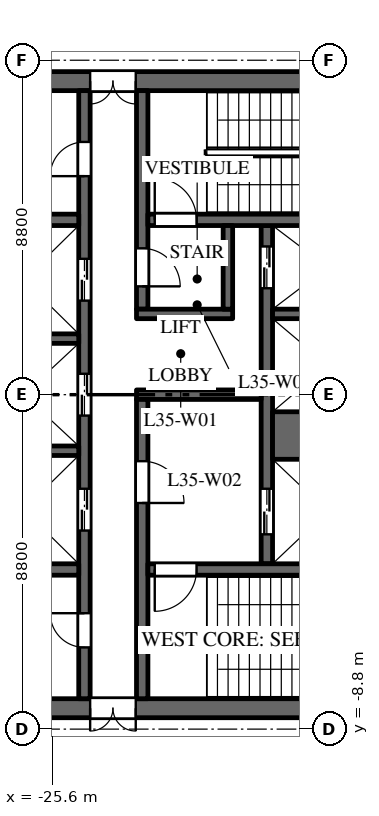
"""IFC4 building model, lengths in metres.
Left out: names, types, materials, properties, quantities, classifications, styles, units other than length and angle.
Written with IfcOpenShell. Run it as: python <this file> out.ifc"""

import sys

from ifc_helpers import new_model, si_unit, direction, frame, frame_2d, origin, place, context, subcontext, project, spatial, rectangle, extrude, element, fill, save


model = new_model("IFC4")
c1 = context("Model", 3, precision=1e-05, world=origin(), true_north=direction((0.0, 1.0)))
c2 = subcontext(c1, "Body", "Model", "MODEL_VIEW")
j1 = project(units=[si_unit("LENGTHUNIT", "METRE"), si_unit("PLANEANGLEUNIT", "RADIAN")], contexts=[c1])
p1 = place(None, origin())
s1 = spatial("IfcSite", under=j1, at=p1, CompositionType="ELEMENT")
p2 = place(p1, origin())
s2 = spatial("IfcBuilding", under=s1, at=p2, CompositionType="ELEMENT")
p3 = place(p2, frame((0.0, 0.0, 154.0)))
s3 = spatial("IfcBuildingStorey", under=s2, at=p3, CompositionType="ELEMENT", Elevation=154.0)
p4 = place(p3, frame((-16.5, 8.25, 0.0), z_axis=(0.0, 0.0, 1.0), x_axis=(-1.0, 0.0, 0.0)))
e1 = element("IfcWall", 1, at=p4, inside=s3, PredefinedType="SHEAR", context=c2, shape_type="SweptSolid", body=[
    extrude(rectangle(XDim=15.0, YDim=0.5, at=frame_2d((7.5, 0.0))), origin(), (0.0, 0.0, 1.0), 3.7),
])
p5 = place(p4, frame((6.9, 0.0, 0.0)))
e2 = element("IfcOpeningElement", 2, at=p5, cuts=e1, PredefinedType="OPENING", context=c2, shape_type="SweptSolid", body=[
    extrude(rectangle(XDim=1.2, YDim=2.1, at=frame_2d((0.6, 1.05))), frame((0.0, 0.26, 0.0), z_axis=(0.0, -1.0, 0.0), x_axis=(1.0, 0.0, 0.0)), (0.0, 0.0, 1.0), 0.52),
])
p6 = place(p4, frame((12.05, 0.0, 0.0)))
e3 = element("IfcOpeningElement", 3, at=p6, cuts=e1, PredefinedType="OPENING", context=c2, shape_type="SweptSolid", body=[
    extrude(rectangle(XDim=0.9, YDim=2.1, at=frame_2d((0.45, 1.05))), frame((0.0, 0.26, 0.0), z_axis=(0.0, -1.0, 0.0), x_axis=(1.0, 0.0, 0.0)), (0.0, 0.0, 1.0), 0.52),
])
p7 = place(p3, frame((-16.5, -8.25, 0.0), z_axis=(0.0, 0.0, 1.0), x_axis=(-1.0, 0.0, 0.0)))
e4 = element("IfcWall", 4, at=p7, inside=s3, PredefinedType="SHEAR", context=c2, shape_type="SweptSolid", body=[
    extrude(rectangle(XDim=15.0, YDim=0.5, at=frame_2d((7.5, 0.0))), origin(), (0.0, 0.0, 1.0), 3.7),
])
p8 = place(p7, frame((6.9, 0.0, 0.0)))
e5 = element("IfcOpeningElement", 5, at=p8, cuts=e4, PredefinedType="OPENING", context=c2, shape_type="SweptSolid", body=[
    extrude(rectangle(XDim=1.2, YDim=2.1, at=frame_2d((0.6, 1.05))), frame((0.0, 0.26, 0.0), z_axis=(0.0, -1.0, 0.0), x_axis=(1.0, 0.0, 0.0)), (0.0, 0.0, 1.0), 0.52),
])
p9 = place(p7, frame((12.05, 0.0, 0.0)))
e6 = element("IfcOpeningElement", 6, at=p9, cuts=e4, PredefinedType="OPENING", context=c2, shape_type="SweptSolid", body=[
    extrude(rectangle(XDim=0.9, YDim=2.1, at=frame_2d((0.45, 1.05))), frame((0.0, 0.26, 0.0), z_axis=(0.0, -1.0, 0.0), x_axis=(1.0, 0.0, 0.0)), (0.0, 0.0, 1.0), 0.52),
])
p10 = place(p3, frame((-19.95, -4.45, 0.0), z_axis=(0.0, 0.0, 1.0), x_axis=(0.0, 1.0, 0.0)))
e7 = element("IfcWall", 7, at=p10, inside=s3, PredefinedType="SHEAR", context=c2, shape_type="SweptSolid", body=[
    extrude(rectangle(XDim=8.9, YDim=0.3, at=frame_2d((4.45, 0.0))), origin(), (0.0, 0.0, 1.0), 3.7),
])
p11 = place(p10, frame((0.775, 0.0, 0.0)))
e8 = element("IfcOpeningElement", 8, at=p11, cuts=e7, PredefinedType="OPENING", context=c2, shape_type="SweptSolid", body=[
    extrude(rectangle(XDim=1.2, YDim=2.1, at=frame_2d((0.6, 1.05))), frame((0.0, 0.16, 0.0), z_axis=(0.0, -1.0, 0.0), x_axis=(1.0, 0.0, 0.0)), (0.0, 0.0, 1.0), 0.32),
])
p12 = place(p10, frame((7.25, 0.0, 0.0)))
e9 = element("IfcOpeningElement", 9, at=p12, cuts=e7, PredefinedType="OPENING", context=c2, shape_type="SweptSolid", body=[
    extrude(rectangle(XDim=1.1, YDim=2.1, at=frame_2d((0.55, 1.05))), frame((0.0, 0.16, 0.0), z_axis=(0.0, -1.0, 0.0), x_axis=(1.0, 0.0, 0.0)), (0.0, 0.0, 1.0), 0.32),
])
p13 = place(p3, frame((-24.75, -8.0, 0.0), z_axis=(0.0, 0.0, 1.0), x_axis=(0.0, 1.0, 0.0)))
e10 = element("IfcWall", 10, at=p13, inside=s3, PredefinedType="SHEAR", context=c2, shape_type="SweptSolid", body=[
    extrude(rectangle(XDim=16.0, YDim=0.3, at=frame_2d((8.0, 0.0))), origin(), (0.0, 0.0, 1.0), 3.7),
])
p14 = place(p13, frame((4.425, 0.0, 0.0)))
e11 = element("IfcOpeningElement", 11, at=p14, cuts=e10, PredefinedType="OPENING", context=c2, shape_type="SweptSolid", body=[
    extrude(rectangle(XDim=1.1, YDim=2.1, at=frame_2d((0.55, 1.05))), frame((0.0, 0.16, 0.0), z_axis=(0.0, -1.0, 0.0), x_axis=(1.0, 0.0, 0.0)), (0.0, 0.0, 1.0), 0.32),
])
p15 = place(p13, frame((7.45, 0.0, 0.0)))
e12 = element("IfcOpeningElement", 12, at=p15, cuts=e10, PredefinedType="OPENING", context=c2, shape_type="SweptSolid", body=[
    extrude(rectangle(XDim=1.1, YDim=2.1, at=frame_2d((0.55, 1.05))), frame((0.0, 0.16, 0.0), z_axis=(0.0, -1.0, 0.0), x_axis=(1.0, 0.0, 0.0)), (0.0, 0.0, 1.0), 0.32),
])
p16 = place(p13, frame((10.475, 0.0, 0.0)))
e13 = element("IfcOpeningElement", 13, at=p16, cuts=e10, PredefinedType="OPENING", context=c2, shape_type="SweptSolid", body=[
    extrude(rectangle(XDim=1.1, YDim=2.1, at=frame_2d((0.55, 1.05))), frame((0.0, 0.16, 0.0), z_axis=(0.0, -1.0, 0.0), x_axis=(1.0, 0.0, 0.0)), (0.0, 0.0, 1.0), 0.32),
])
p17 = place(p13, frame((13.75, 0.0, 0.0)))
e14 = element("IfcOpeningElement", 14, at=p17, cuts=e10, PredefinedType="OPENING", context=c2, shape_type="SweptSolid", body=[
    extrude(rectangle(XDim=0.9, YDim=2.1, at=frame_2d((0.45, 1.05))), frame((0.0, 0.16, 0.0), z_axis=(0.0, -1.0, 0.0), x_axis=(1.0, 0.0, 0.0)), (0.0, 0.0, 1.0), 0.32),
])
p18 = place(p13, frame((1.35, 0.0, 0.0)))
e15 = element("IfcOpeningElement", 15, at=p18, cuts=e10, PredefinedType="OPENING", context=c2, shape_type="SweptSolid", body=[
    extrude(rectangle(XDim=0.9, YDim=2.1, at=frame_2d((0.45, 1.05))), frame((0.0, 0.16, 0.0), z_axis=(0.0, -1.0, 0.0), x_axis=(1.0, 0.0, 0.0)), (0.0, 0.0, 1.0), 0.32),
])
p19 = place(p3, frame((-20.1, 0.0, 0.0), z_axis=(0.0, 0.0, 1.0), x_axis=(-1.0, 0.0, 0.0)))
e16 = element("IfcWall", 16, at=p19, inside=s3, PredefinedType="SHEAR", context=c2, shape_type="SweptSolid", body=[
    extrude(rectangle(XDim=3.28, YDim=0.25, at=frame_2d((1.64, 0.0))), origin(), (0.0, 0.0, 1.0), 3.7),
])
p20 = place(p3, frame((-24.9, 4.6, 0.0), z_axis=(0.0, 0.0, 1.0), x_axis=(-1.0, 0.0, 0.0)))
e17 = element("IfcWall", 17, at=p20, inside=s3, PredefinedType="SHEAR", context=c2, shape_type="SweptSolid", body=[
    extrude(rectangle(XDim=6.1, YDim=0.3, at=frame_2d((3.05, 0.0))), origin(), (0.0, 0.0, 1.0), 3.7),
])
p21 = place(p20, frame((4.2, 0.0, 0.0)))
e18 = element("IfcOpeningElement", 18, at=p21, cuts=e17, PredefinedType="OPENING", context=c2, shape_type="SweptSolid", body=[
    extrude(rectangle(XDim=0.9, YDim=2.1, at=frame_2d((0.45, 1.05))), frame((0.0, 0.16, 0.0), z_axis=(0.0, -1.0, 0.0), x_axis=(1.0, 0.0, 0.0)), (0.0, 0.0, 1.0), 0.32),
])
p22 = place(p3, frame((-24.9, -4.6, 0.0), z_axis=(0.0, 0.0, 1.0), x_axis=(-1.0, 0.0, 0.0)))
e19 = element("IfcWall", 19, at=p22, inside=s3, PredefinedType="SHEAR", context=c2, shape_type="SweptSolid", body=[
    extrude(rectangle(XDim=6.1, YDim=0.3, at=frame_2d((3.05, 0.0))), origin(), (0.0, 0.0, 1.0), 3.7),
])
p23 = place(p3, frame((-16.9, -1.075, 0.0), z_axis=(0.0, 0.0, 1.0), x_axis=(-1.0, 0.0, 0.0)))
e20 = element("IfcWall", 20, at=p23, inside=s3, PredefinedType="SHEAR", context=c2, shape_type="SweptSolid", body=[
    extrude(rectangle(XDim=2.9, YDim=1.25, at=frame_2d((1.45, 0.0))), origin(), (0.0, 0.0, 1.0), 3.7),
])
for number, where, z_axis, x_axis in (
    (21, (-16.9, 2.125, 0.0), (0.0, 0.0, 1.0), (-1.0, 0.0, 0.0)),
    (22, (-24.9, -1.475, 0.0), (0.0, 0.0, 1.0), (-1.0, 0.0, 0.0)),
    (23, (-24.9, 1.475, 0.0), (0.0, 0.0, 1.0), (-1.0, 0.0, 0.0)),
):
    element("IfcWall", number, at=place(p3, frame(where, z_axis=z_axis, x_axis=x_axis)), inside=s3, PredefinedType="SHEAR", context=c2, shape_type="SweptSolid", body=[
        extrude(rectangle(XDim=2.9, YDim=0.25, at=frame_2d((1.45, 0.0))), origin(), (0.0, 0.0, 1.0), 3.7),
    ])
p24 = place(p3, frame((-23.23, 2.25, 0.0), z_axis=(0.0, 0.0, 1.0), x_axis=(0.0, 1.0, 0.0)))
e24 = element("IfcWall", 24, at=p24, inside=s3, PredefinedType="SHEAR", context=c2, shape_type="SweptSolid", body=[
    extrude(rectangle(XDim=5.75, YDim=0.3, at=frame_2d((2.875, 0.0))), origin(), (0.0, 0.0, 1.0), 3.7),
])
p25 = place(p24, frame((0.6, 0.0, 0.0)))
e25 = element("IfcOpeningElement", 25, at=p25, cuts=e24, PredefinedType="OPENING", context=c2, shape_type="SweptSolid", body=[
    extrude(rectangle(XDim=1.0, YDim=2.1, at=frame_2d((0.5, 1.05))), frame((0.0, 0.16, 0.0), z_axis=(0.0, -1.0, 0.0), x_axis=(1.0, 0.0, 0.0)), (0.0, 0.0, 1.0), 0.32),
])
p26 = place(p3, frame((-23.23, -8.0, 0.0), z_axis=(0.0, 0.0, 1.0), x_axis=(0.0, 1.0, 0.0)))
e26 = element("IfcWall", 26, at=p26, inside=s3, PredefinedType="SHEAR", context=c2, shape_type="SweptSolid", body=[
    extrude(rectangle(XDim=7.875, YDim=0.3, at=frame_2d((3.938, 0.0))), origin(), (0.0, 0.0, 1.0), 3.7),
])
p27 = place(p26, frame((5.15, 0.0, 0.0)))
e27 = element("IfcOpeningElement", 27, at=p27, cuts=e26, PredefinedType="OPENING", context=c2, shape_type="SweptSolid", body=[
    extrude(rectangle(XDim=1.1, YDim=2.1, at=frame_2d((0.55, 1.05))), frame((0.0, 0.16, 0.0), z_axis=(0.0, -1.0, 0.0), x_axis=(1.0, 0.0, 0.0)), (0.0, 0.0, 1.0), 0.32),
])
p28 = place(p3, frame((-16.9, 4.6, 0.0), z_axis=(0.0, 0.0, 1.0), x_axis=(-1.0, 0.0, 0.0)))
e28 = element("IfcWall", 28, at=p28, inside=s3, PredefinedType="SHEAR", context=c2, shape_type="SweptSolid", body=[
    extrude(rectangle(XDim=6.18, YDim=0.3, at=frame_2d((3.09, 0.0))), origin(), (0.0, 0.0, 1.0), 3.7),
])
p29 = place(p28, frame((4.9, 0.0, 0.0)))
e29 = element("IfcOpeningElement", 29, at=p29, cuts=e28, PredefinedType="OPENING", context=c2, shape_type="SweptSolid", body=[
    extrude(rectangle(XDim=1.1, YDim=2.1, at=frame_2d((0.55, 1.05))), frame((0.0, 0.16, 0.0), z_axis=(0.0, -1.0, 0.0), x_axis=(1.0, 0.0, 0.0)), (0.0, 0.0, 1.0), 0.32),
])
p30 = place(p3, frame((-16.9, -4.6, 0.0), z_axis=(0.0, 0.0, 1.0), x_axis=(-1.0, 0.0, 0.0)))
e30 = element("IfcWall", 30, at=p30, inside=s3, PredefinedType="SHEAR", context=c2, shape_type="SweptSolid", body=[
    extrude(rectangle(XDim=6.18, YDim=0.3, at=frame_2d((3.09, 0.0))), origin(), (0.0, 0.0, 1.0), 3.7),
])
p31 = place(p30, frame((4.9, 0.0, 0.0)))
e31 = element("IfcOpeningElement", 31, at=p31, cuts=e30, PredefinedType="OPENING", context=c2, shape_type="SweptSolid", body=[
    extrude(rectangle(XDim=1.1, YDim=2.1, at=frame_2d((0.55, 1.05))), frame((0.0, 0.16, 0.0), z_axis=(0.0, -1.0, 0.0), x_axis=(1.0, 0.0, 0.0)), (0.0, 0.0, 1.0), 0.32),
])
p32 = place(p3, frame((-20.85, 2.125, 0.0), z_axis=(0.0, 0.0, 1.0), x_axis=(-1.0, 0.0, 0.0)))
e32 = element("IfcWall", 32, at=p32, inside=s3, PredefinedType="SHEAR", context=c2, shape_type="SweptSolid", body=[
    extrude(rectangle(XDim=2.53, YDim=0.25, at=frame_2d((1.265, 0.0))), origin(), (0.0, 0.0, 1.0), 3.7),
])
p33 = place(p3, frame((-20.975, 2.25, 0.0), z_axis=(0.0, 0.0, 1.0), x_axis=(0.0, 1.0, 0.0)))
e33 = element("IfcWall", 33, at=p33, inside=s3, PredefinedType="SHEAR", context=c2, shape_type="SweptSolid", body=[
    extrude(rectangle(XDim=2.2, YDim=0.25, at=frame_2d((1.1, 0.0))), origin(), (0.0, 0.0, 1.0), 3.7),
])
p34 = place(p11, origin())
e34 = element("IfcDoor", 34, at=p34, inside=s3, OperationType="DOUBLE_DOOR_SLIDING", PredefinedType="DOOR", context=c2, shape_type="SweptSolid", body=[
    extrude(rectangle(XDim=1.2, YDim=2.1, at=frame_2d((0.6, 1.05))), frame((0.0, 0.025, 0.0), z_axis=(0.0, -1.0, 0.0), x_axis=(1.0, 0.0, 0.0)), (0.0, 0.0, 1.0), 0.05),
])
fill(e8, e34)
p35 = place(p12, origin())
e35 = element("IfcDoor", 35, at=p35, inside=s3, OperationType="DOUBLE_DOOR_SLIDING", PredefinedType="DOOR", context=c2, shape_type="SweptSolid", body=[
    extrude(rectangle(XDim=1.1, YDim=2.1, at=frame_2d((0.55, 1.05))), frame((0.0, 0.025, 0.0), z_axis=(0.0, -1.0, 0.0), x_axis=(1.0, 0.0, 0.0)), (0.0, 0.0, 1.0), 0.05),
])
fill(e9, e35)
p36 = place(p14, origin())
e36 = element("IfcDoor", 36, at=p36, inside=s3, OperationType="DOUBLE_DOOR_SLIDING", PredefinedType="DOOR", context=c2, shape_type="SweptSolid", body=[
    extrude(rectangle(XDim=1.1, YDim=2.1, at=frame_2d((0.55, 1.05))), frame((0.0, 0.025, 0.0), z_axis=(0.0, -1.0, 0.0), x_axis=(1.0, 0.0, 0.0)), (0.0, 0.0, 1.0), 0.05),
])
fill(e11, e36)
p37 = place(p15, origin())
e37 = element("IfcDoor", 37, at=p37, inside=s3, OperationType="DOUBLE_DOOR_SLIDING", PredefinedType="DOOR", context=c2, shape_type="SweptSolid", body=[
    extrude(rectangle(XDim=1.1, YDim=2.1, at=frame_2d((0.55, 1.05))), frame((0.0, 0.025, 0.0), z_axis=(0.0, -1.0, 0.0), x_axis=(1.0, 0.0, 0.0)), (0.0, 0.0, 1.0), 0.05),
])
fill(e12, e37)
p38 = place(p16, origin())
e38 = element("IfcDoor", 38, at=p38, inside=s3, OperationType="DOUBLE_DOOR_SLIDING", PredefinedType="DOOR", context=c2, shape_type="SweptSolid", body=[
    extrude(rectangle(XDim=1.1, YDim=2.1, at=frame_2d((0.55, 1.05))), frame((0.0, 0.025, 0.0), z_axis=(0.0, -1.0, 0.0), x_axis=(1.0, 0.0, 0.0)), (0.0, 0.0, 1.0), 0.05),
])
fill(e13, e38)
p39 = place(p29, origin())
e39 = element("IfcDoor", 39, at=p39, inside=s3, OperationType="SINGLE_SWING_RIGHT", PredefinedType="DOOR", context=c2, shape_type="SweptSolid", body=[
    extrude(rectangle(XDim=1.1, YDim=2.1, at=frame_2d((0.55, 1.05))), frame((0.0, 0.025, 0.0), z_axis=(0.0, -1.0, 0.0), x_axis=(1.0, 0.0, 0.0)), (0.0, 0.0, 1.0), 0.05),
])
fill(e29, e39)
p40 = place(p31, origin())
e40 = element("IfcDoor", 40, at=p40, inside=s3, OperationType="SINGLE_SWING_LEFT", PredefinedType="DOOR", context=c2, shape_type="SweptSolid", body=[
    extrude(rectangle(XDim=1.1, YDim=2.1, at=frame_2d((0.55, 1.05))), frame((0.0, 0.025, 0.0), z_axis=(0.0, -1.0, 0.0), x_axis=(1.0, 0.0, 0.0)), (0.0, 0.0, 1.0), 0.05),
])
fill(e31, e40)
p41 = place(p27, origin())
e41 = element("IfcDoor", 41, at=p41, inside=s3, OperationType="SINGLE_SWING_LEFT", PredefinedType="DOOR", context=c2, shape_type="SweptSolid", body=[
    extrude(rectangle(XDim=1.1, YDim=2.1, at=frame_2d((0.55, 1.05))), frame((0.0, 0.025, 0.0), z_axis=(0.0, -1.0, 0.0), x_axis=(1.0, 0.0, 0.0)), (0.0, 0.0, 1.0), 0.05),
])
fill(e27, e41)
p42 = place(p25, origin())
e42 = element("IfcDoor", 42, at=p42, inside=s3, OperationType="SINGLE_SWING_LEFT", PredefinedType="DOOR", context=c2, shape_type="SweptSolid", body=[
    extrude(rectangle(XDim=1.0, YDim=2.1, at=frame_2d((0.5, 1.05))), frame((0.0, 0.025, 0.0), z_axis=(0.0, -1.0, 0.0), x_axis=(1.0, 0.0, 0.0)), (0.0, 0.0, 1.0), 0.05),
])
fill(e25, e42)
p43 = place(p5, origin())
e43 = element("IfcDoor", 43, at=p43, inside=s3, OperationType="DOUBLE_DOOR_DOUBLE_SWING", PredefinedType="DOOR", context=c2, shape_type="SweptSolid", body=[
    extrude(rectangle(XDim=1.2, YDim=2.1, at=frame_2d((0.6, 1.05))), frame((0.0, 0.025, 0.0), z_axis=(0.0, -1.0, 0.0), x_axis=(1.0, 0.0, 0.0)), (0.0, 0.0, 1.0), 0.05),
])
fill(e2, e43)
p44 = place(p8, origin())
e44 = element("IfcDoor", 44, at=p44, inside=s3, OperationType="DOUBLE_DOOR_DOUBLE_SWING", PredefinedType="DOOR", context=c2, shape_type="SweptSolid", body=[
    extrude(rectangle(XDim=1.2, YDim=2.1, at=frame_2d((0.6, 1.05))), frame((0.0, 0.025, 0.0), z_axis=(0.0, -1.0, 0.0), x_axis=(1.0, 0.0, 0.0)), (0.0, 0.0, 1.0), 0.05),
])
fill(e5, e44)
p45 = place(p17, origin())
e45 = element("IfcDoor", 45, at=p45, inside=s3, OperationType="SINGLE_SWING_RIGHT", PredefinedType="DOOR", context=c2, shape_type="SweptSolid", body=[
    extrude(rectangle(XDim=0.9, YDim=2.1, at=frame_2d((0.45, 1.05))), frame((0.0, 0.025, 0.0), z_axis=(0.0, -1.0, 0.0), x_axis=(1.0, 0.0, 0.0)), (0.0, 0.0, 1.0), 0.05),
])
fill(e14, e45)
p46 = place(p18, origin())
e46 = element("IfcDoor", 46, at=p46, inside=s3, OperationType="SINGLE_SWING_LEFT", PredefinedType="DOOR", context=c2, shape_type="SweptSolid", body=[
    extrude(rectangle(XDim=0.9, YDim=2.1, at=frame_2d((0.45, 1.05))), frame((0.0, 0.025, 0.0), z_axis=(0.0, -1.0, 0.0), x_axis=(1.0, 0.0, 0.0)), (0.0, 0.0, 1.0), 0.05),
])
fill(e15, e46)
save(model, sys.argv[1])
